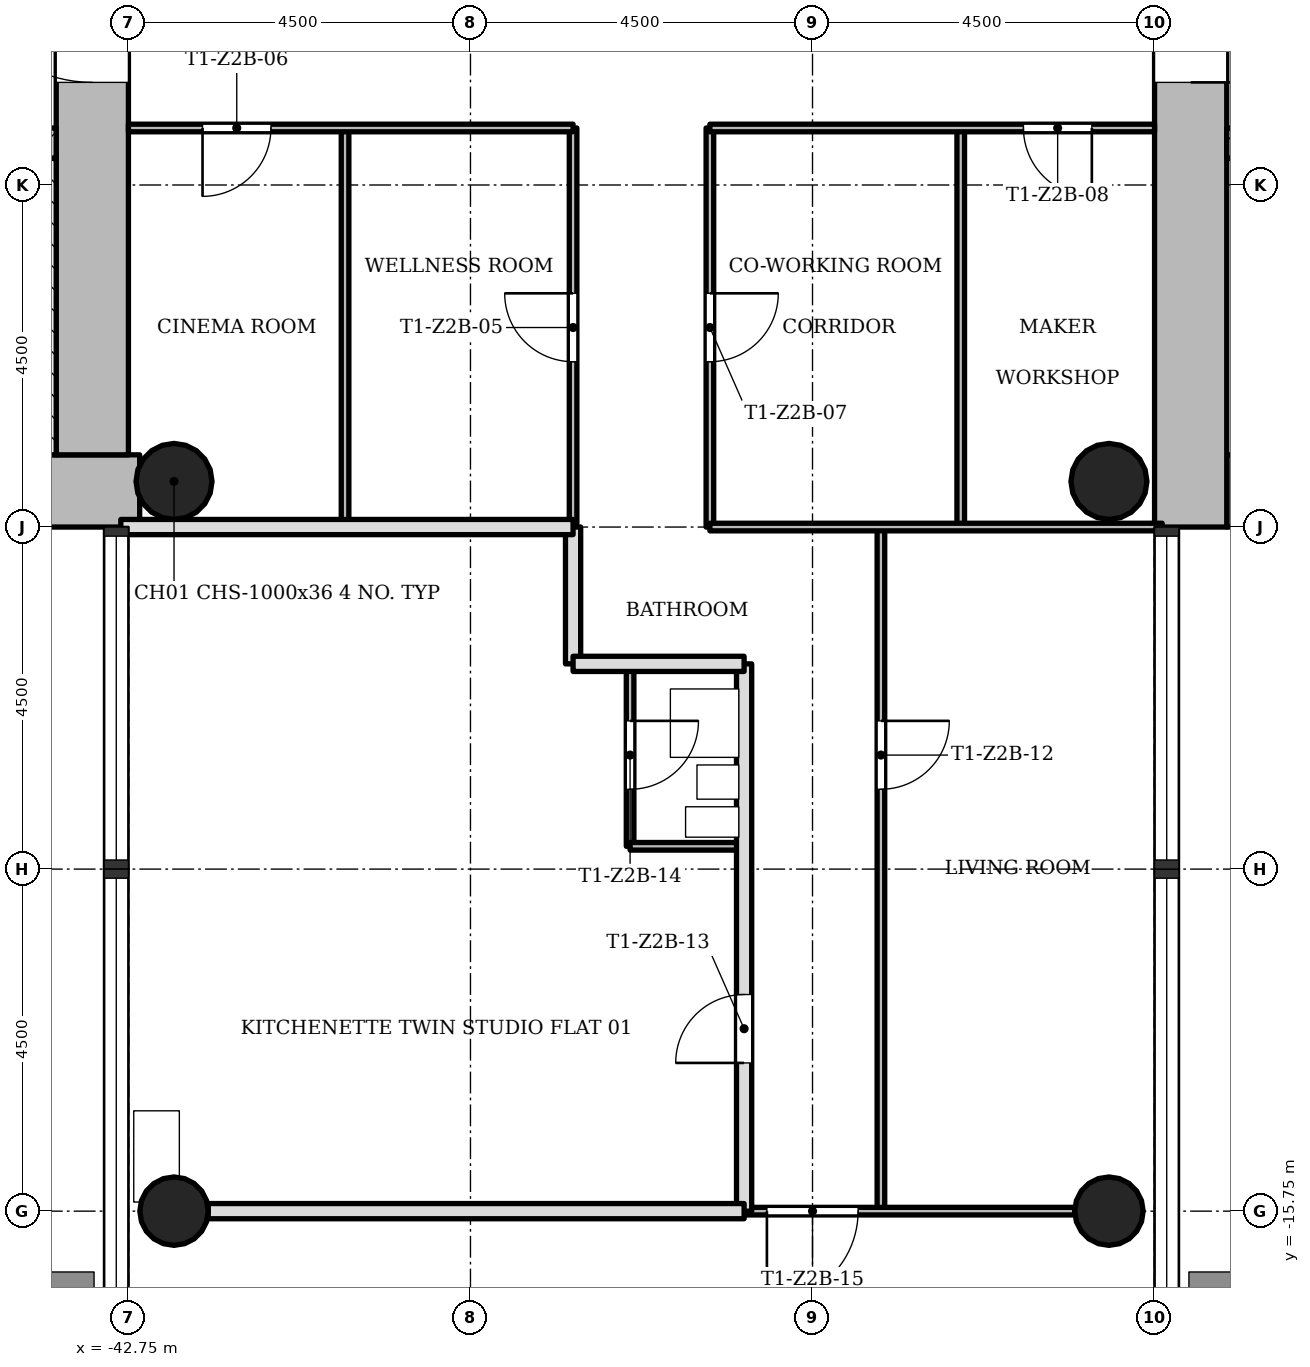
"""IFC4 building model, lengths in metres.
Left out: names, types, materials, properties, quantities, classifications, styles, units other than length and angle.
Written with IfcOpenShell. Run it as: python <this file> out.ifc"""

import sys

from ifc_helpers import new_model, si_unit, direction, frame, frame_2d, origin, origin_2d, place, context, subcontext, project, spatial, rectangle, hollow_circle, extrude, element, fill, save


model = new_model("IFC4")
c1 = context("Model", 3, precision=1e-05, world=origin(), true_north=direction((0.0, 1.0)))
c2 = subcontext(c1, "Body", "Model", "MODEL_VIEW")
j1 = project(units=[si_unit("LENGTHUNIT", "METRE"), si_unit("PLANEANGLEUNIT", "RADIAN")], contexts=[c1])
p1 = place(None, origin())
s1 = spatial("IfcSite", under=j1, at=p1, CompositionType="ELEMENT")
p2 = place(p1, origin())
s2 = spatial("IfcBuilding", under=s1, at=p2, CompositionType="ELEMENT")
p3 = place(p2, frame((0.0, 0.0, 80.0)))
s3 = spatial("IfcBuildingStorey", under=s2, at=p3, CompositionType="ELEMENT", Elevation=80.0)
p4 = place(p3, frame((-28.3, -6.275, 0.0), z_axis=(0.0, 0.0, 1.0), x_axis=(1.0, 0.0, 0.0)))
e1 = element("IfcWall", 1, at=p4, inside=s3, PredefinedType="SHEAR", context=c2, shape_type="SweptSolid", body=[
    extrude(rectangle(XDim=8.05, YDim=0.95, at=frame_2d((4.025, 0.0))), origin(), (0.0, 0.0, 1.0), 3.4),
])
p5 = place(p3, frame((-28.775, 5.8, 0.0), z_axis=(0.0, 0.0, 1.0), x_axis=(0.0, -1.0, 0.0)))
e2 = element("IfcWall", 2, at=p5, inside=s3, PredefinedType="SHEAR", context=c2, shape_type="SweptSolid", body=[
    extrude(rectangle(XDim=12.55, YDim=0.95, at=frame_2d((6.275, 0.0))), origin(), (0.0, 0.0, 1.0), 3.4),
])
p6 = place(p5, frame((4.9, 0.0, 0.0)))
e3 = element("IfcOpeningElement", 3, at=p6, cuts=e2, PredefinedType="OPENING", context=c2, shape_type="SweptSolid", body=[
    extrude(rectangle(XDim=1.8, YDim=2.1, at=frame_2d((0.9, 1.05))), frame((0.0, 0.485, 0.0), z_axis=(0.0, -1.0, 0.0), x_axis=(1.0, 0.0, 0.0)), (0.0, 0.0, 1.0), 0.97),
])
p7 = place(p3, frame((-28.3, -1.7, 0.0), z_axis=(0.0, 0.0, 1.0), x_axis=(1.0, 0.0, 0.0)))
e4 = element("IfcWall", 4, at=p7, inside=s3, PredefinedType="SHEAR", context=c2, shape_type="SweptSolid", body=[
    extrude(rectangle(XDim=7.1, YDim=0.4, at=frame_2d((3.55, 0.0))), origin(), (0.0, 0.0, 1.0), 3.4),
])
p8 = place(p7, frame((0.8, 0.0, 0.0)))
e5 = element("IfcOpeningElement", 5, at=p8, cuts=e4, PredefinedType="OPENING", context=c2, shape_type="SweptSolid", body=[
    extrude(rectangle(XDim=1.1, YDim=2.1, at=frame_2d((0.55, 1.05))), frame((0.0, 0.21, 0.0), z_axis=(0.0, -1.0, 0.0), x_axis=(1.0, 0.0, 0.0)), (0.0, 0.0, 1.0), 0.42),
])
p9 = place(p7, frame((3.0, 0.0, 0.0)))
e6 = element("IfcOpeningElement", 6, at=p9, cuts=e4, PredefinedType="OPENING", context=c2, shape_type="SweptSolid", body=[
    extrude(rectangle(XDim=1.1, YDim=2.1, at=frame_2d((0.55, 1.05))), frame((0.0, 0.21, 0.0), z_axis=(0.0, -1.0, 0.0), x_axis=(1.0, 0.0, 0.0)), (0.0, 0.0, 1.0), 0.42),
])
p10 = place(p7, frame((5.2, 0.0, 0.0)))
e7 = element("IfcOpeningElement", 7, at=p10, cuts=e4, PredefinedType="OPENING", context=c2, shape_type="SweptSolid", body=[
    extrude(rectangle(XDim=1.1, YDim=2.1, at=frame_2d((0.55, 1.05))), frame((0.0, 0.21, 0.0), z_axis=(0.0, -1.0, 0.0), x_axis=(1.0, 0.0, 0.0)), (0.0, 0.0, 1.0), 0.42),
])
p11 = place(p3, frame((-51.298, -6.275, 0.0), z_axis=(0.0, 0.0, 1.0), x_axis=(1.0, 0.0, 0.0)))
e8 = element("IfcWall", 8, at=p11, inside=s3, PredefinedType="SHEAR", context=c2, shape_type="SweptSolid", body=[
    extrude(rectangle(XDim=8.696, YDim=0.95, at=frame_2d((4.348, 0.0))), origin(), (0.0, 0.0, 1.0), 3.4),
])
p12 = place(p3, frame((-43.225, -5.8, 0.0), z_axis=(0.0, 0.0, 1.0), x_axis=(0.0, 1.0, 0.0)))
e9 = element("IfcWall", 9, at=p12, inside=s3, PredefinedType="SHEAR", context=c2, shape_type="SweptSolid", body=[
    extrude(rectangle(XDim=12.55, YDim=0.95, at=frame_2d((6.275, 0.0))), origin(), (0.0, 0.0, 1.0), 3.4),
])
p13 = place(p12, frame((4.9, 0.0, 0.0)))
e10 = element("IfcOpeningElement", 10, at=p13, cuts=e9, PredefinedType="OPENING", context=c2, shape_type="SweptSolid", body=[
    extrude(rectangle(XDim=1.8, YDim=2.1, at=frame_2d((0.9, 1.05))), frame((0.0, 0.485, 0.0), z_axis=(0.0, -1.0, 0.0), x_axis=(1.0, 0.0, 0.0)), (0.0, 0.0, 1.0), 0.97),
])
p14 = place(p3, frame((-50.8, -1.7, 0.0), z_axis=(0.0, 0.0, 1.0), x_axis=(1.0, 0.0, 0.0)))
e11 = element("IfcWall", 11, at=p14, inside=s3, PredefinedType="SHEAR", context=c2, shape_type="SweptSolid", body=[
    extrude(rectangle(XDim=7.1, YDim=0.4, at=frame_2d((3.55, 0.0))), origin(), (0.0, 0.0, 1.0), 3.4),
])
p15 = place(p14, frame((5.5, 0.0, 0.0)))
e12 = element("IfcOpeningElement", 12, at=p15, cuts=e11, PredefinedType="OPENING", context=c2, shape_type="SweptSolid", body=[
    extrude(rectangle(XDim=0.9, YDim=2.1, at=frame_2d((0.45, 1.05))), frame((0.0, 0.21, 0.0), z_axis=(0.0, -1.0, 0.0), x_axis=(1.0, 0.0, 0.0)), (0.0, 0.0, 1.0), 0.42),
])
for number, where, z_axis, x_axis in (
    (13, (-42.15, -15.75, 0.0), (0.0, 0.0, 1.0), (1.0, 0.0, 0.0)),
    (14, (-29.85, -15.75, 0.0), (0.0, 0.0, 1.0), (1.0, 0.0, 0.0)),
):
    element("IfcColumn", number, at=place(p3, frame(where, z_axis=z_axis, x_axis=x_axis)), inside=s3, PredefinedType="COLUMN", context=c2, shape_type="SweptSolid", body=[
        extrude(hollow_circle(Radius=0.45, WallThickness=0.032, at=origin_2d()), origin(), (0.0, 0.0, 1.0), 3.4),
    ])
for number, where, z_axis, x_axis in (
    (15, (-42.15, -6.15, 0.0), (0.0, 0.0, 1.0), (1.0, 0.0, 0.0)),
    (16, (-29.85, -6.15, 0.0), (0.0, 0.0, 1.0), (1.0, 0.0, 0.0)),
):
    element("IfcColumn", number, at=place(p3, frame(where, z_axis=z_axis, x_axis=x_axis)), inside=s3, PredefinedType="COLUMN", context=c2, shape_type="SweptSolid", body=[
        extrude(hollow_circle(Radius=0.5, WallThickness=0.036, at=origin_2d()), origin(), (0.0, 0.0, 1.0), 3.4),
    ])
p16 = place(p3, frame((-39.9, -6.75, 0.0), z_axis=(0.0, 0.0, 1.0), x_axis=(0.0, 1.0, 0.0)))
e17 = element("IfcWall", 17, at=p16, inside=s3, PredefinedType="PARTITIONING", context=c2, shape_type="SweptSolid", body=[
    extrude(rectangle(XDim=5.25, YDim=0.1, at=frame_2d((2.625, 0.0))), origin(), (0.0, 0.0, 1.0), 3.0),
])
p17 = place(p3, frame((-36.9, -6.75, 0.0), z_axis=(0.0, 0.0, 1.0), x_axis=(0.0, 1.0, 0.0)))
e18 = element("IfcWall", 18, at=p17, inside=s3, PredefinedType="PARTITIONING", context=c2, shape_type="SweptSolid", body=[
    extrude(rectangle(XDim=5.25, YDim=0.1, at=frame_2d((2.625, 0.0))), origin(), (0.0, 0.0, 1.0), 3.0),
])
p18 = place(p17, frame((2.175, 0.0, 0.0)))
e19 = element("IfcOpeningElement", 19, at=p18, cuts=e18, PredefinedType="OPENING", context=c2, shape_type="SweptSolid", body=[
    extrude(rectangle(XDim=0.9, YDim=2.1, at=frame_2d((0.45, 1.05))), frame((0.0, 0.06, 0.0), z_axis=(0.0, -1.0, 0.0), x_axis=(1.0, 0.0, 0.0)), (0.0, 0.0, 1.0), 0.12),
])
p19 = place(p3, frame((-36.9, -8.55, 0.0), z_axis=(0.0, 0.0, 1.0), x_axis=(0.0, 1.0, 0.0)))
e20 = element("IfcWall", 20, at=p19, inside=s3, PredefinedType="SOLIDWALL", context=c2, shape_type="SweptSolid", body=[
    extrude(rectangle(XDim=1.8, YDim=0.2, at=frame_2d((0.9, 0.0))), origin(), (0.0, 0.0, 1.0), 3.0),
])
p20 = place(p3, frame((-36.15, -10.95, 0.0), z_axis=(0.0, 0.0, 1.0), x_axis=(0.0, 1.0, 0.0)))
e21 = element("IfcWall", 21, at=p20, inside=s3, PredefinedType="PARTITIONING", context=c2, shape_type="SweptSolid", body=[
    extrude(rectangle(XDim=2.4, YDim=0.1, at=frame_2d((1.2, 0.0))), origin(), (0.0, 0.0, 1.0), 3.0),
])
p21 = place(p20, frame((0.75, 0.0, 0.0)))
e22 = element("IfcOpeningElement", 22, at=p21, cuts=e21, PredefinedType="OPENING", context=c2, shape_type="SweptSolid", body=[
    extrude(rectangle(XDim=0.9, YDim=2.1, at=frame_2d((0.45, 1.05))), frame((0.0, 0.06, 0.0), z_axis=(0.0, -1.0, 0.0), x_axis=(1.0, 0.0, 0.0)), (0.0, 0.0, 1.0), 0.12),
])
p22 = place(p3, frame((-35.1, -6.75, 0.0), z_axis=(0.0, 0.0, 1.0), x_axis=(0.0, 1.0, 0.0)))
e23 = element("IfcWall", 23, at=p22, inside=s3, PredefinedType="PARTITIONING", context=c2, shape_type="SweptSolid", body=[
    extrude(rectangle(XDim=5.25, YDim=0.1, at=frame_2d((2.625, 0.0))), origin(), (0.0, 0.0, 1.0), 3.0),
])
p23 = place(p22, frame((2.175, 0.0, 0.0)))
e24 = element("IfcOpeningElement", 24, at=p23, cuts=e23, PredefinedType="OPENING", context=c2, shape_type="SweptSolid", body=[
    extrude(rectangle(XDim=0.9, YDim=2.1, at=frame_2d((0.45, 1.05))), frame((0.0, 0.06, 0.0), z_axis=(0.0, -1.0, 0.0), x_axis=(1.0, 0.0, 0.0)), (0.0, 0.0, 1.0), 0.12),
])
p24 = place(p3, frame((-34.65, -15.75, 0.0), z_axis=(0.0, 0.0, 1.0), x_axis=(0.0, 1.0, 0.0)))
e25 = element("IfcWall", 25, at=p24, inside=s3, PredefinedType="SOLIDWALL", context=c2, shape_type="SweptSolid", body=[
    extrude(rectangle(XDim=7.2, YDim=0.2, at=frame_2d((3.6, 0.0))), origin(), (0.0, 0.0, 1.0), 3.0),
])
p25 = place(p24, frame((1.95, 0.0, 0.0)))
e26 = element("IfcOpeningElement", 26, at=p25, cuts=e25, PredefinedType="OPENING", context=c2, shape_type="SweptSolid", body=[
    extrude(rectangle(XDim=0.9, YDim=2.1, at=frame_2d((0.45, 1.05))), frame((0.0, 0.11, 0.0), z_axis=(0.0, -1.0, 0.0), x_axis=(1.0, 0.0, 0.0)), (0.0, 0.0, 1.0), 0.22),
])
p26 = place(p3, frame((-32.85, -15.75, 0.0), z_axis=(0.0, 0.0, 1.0), x_axis=(0.0, 1.0, 0.0)))
e27 = element("IfcWall", 27, at=p26, inside=s3, PredefinedType="PARTITIONING", context=c2, shape_type="SweptSolid", body=[
    extrude(rectangle(XDim=9.0, YDim=0.1, at=frame_2d((4.5, 0.0))), origin(), (0.0, 0.0, 1.0), 3.0),
])
p27 = place(p26, frame((5.55, 0.0, 0.0)))
e28 = element("IfcOpeningElement", 28, at=p27, cuts=e27, PredefinedType="OPENING", context=c2, shape_type="SweptSolid", body=[
    extrude(rectangle(XDim=0.9, YDim=2.1, at=frame_2d((0.45, 1.05))), frame((0.0, 0.06, 0.0), z_axis=(0.0, -1.0, 0.0), x_axis=(1.0, 0.0, 0.0)), (0.0, 0.0, 1.0), 0.12),
])
p28 = place(p3, frame((-31.8, -6.75, 0.0), z_axis=(0.0, 0.0, 1.0), x_axis=(0.0, 1.0, 0.0)))
e29 = element("IfcWall", 29, at=p28, inside=s3, PredefinedType="PARTITIONING", context=c2, shape_type="SweptSolid", body=[
    extrude(rectangle(XDim=5.25, YDim=0.1, at=frame_2d((2.625, 0.0))), origin(), (0.0, 0.0, 1.0), 3.0),
])
p29 = place(p3, frame((-34.65, -15.75, 0.0), z_axis=(0.0, 0.0, 1.0), x_axis=(1.0, 0.0, 0.0)))
e30 = element("IfcWall", 30, at=p29, inside=s3, PredefinedType="PARTITIONING", context=c2, shape_type="SweptSolid", body=[
    extrude(rectangle(XDim=4.35, YDim=0.1, at=frame_2d((2.175, 0.0))), origin(), (0.0, 0.0, 1.0), 3.0),
])
p30 = place(p29, frame((0.3, 0.0, 0.0)))
e31 = element("IfcOpeningElement", 31, at=p30, cuts=e30, PredefinedType="OPENING", context=c2, shape_type="SweptSolid", body=[
    extrude(rectangle(XDim=1.2, YDim=2.1, at=frame_2d((0.6, 1.05))), frame((0.0, 0.06, 0.0), z_axis=(0.0, -1.0, 0.0), x_axis=(1.0, 0.0, 0.0)), (0.0, 0.0, 1.0), 0.12),
])
p31 = place(p3, frame((-41.7, -15.75, 0.0), z_axis=(0.0, 0.0, 1.0), x_axis=(1.0, 0.0, 0.0)))
e32 = element("IfcWall", 32, at=p31, inside=s3, PredefinedType="SOLIDWALL", context=c2, shape_type="SweptSolid", body=[
    extrude(rectangle(XDim=7.05, YDim=0.2, at=frame_2d((3.525, 0.0))), origin(), (0.0, 0.0, 1.0), 3.0),
])
p32 = place(p3, frame((-36.15, -10.95, 0.0), z_axis=(0.0, 0.0, 1.0), x_axis=(1.0, 0.0, 0.0)))
e33 = element("IfcWall", 33, at=p32, inside=s3, PredefinedType="PARTITIONING", context=c2, shape_type="SweptSolid", body=[
    extrude(rectangle(XDim=1.5, YDim=0.1, at=frame_2d((0.75, 0.0))), origin(), (0.0, 0.0, 1.0), 3.0),
])
p33 = place(p3, frame((-36.9, -8.55, 0.0), z_axis=(0.0, 0.0, 1.0), x_axis=(1.0, 0.0, 0.0)))
e34 = element("IfcWall", 34, at=p33, inside=s3, PredefinedType="SOLIDWALL", context=c2, shape_type="SweptSolid", body=[
    extrude(rectangle(XDim=2.25, YDim=0.2, at=frame_2d((1.125, 0.0))), origin(), (0.0, 0.0, 1.0), 3.0),
])
p34 = place(p3, frame((-35.1, -6.75, 0.0), z_axis=(0.0, 0.0, 1.0), x_axis=(1.0, 0.0, 0.0)))
e35 = element("IfcWall", 35, at=p34, inside=s3, PredefinedType="PARTITIONING", context=c2, shape_type="SweptSolid", body=[
    extrude(rectangle(XDim=5.95, YDim=0.1, at=frame_2d((2.975, 0.0))), origin(), (0.0, 0.0, 1.0), 3.0),
])
p35 = place(p3, frame((-42.85, -6.75, 0.0), z_axis=(0.0, 0.0, 1.0), x_axis=(1.0, 0.0, 0.0)))
e36 = element("IfcWall", 36, at=p35, inside=s3, PredefinedType="SOLIDWALL", context=c2, shape_type="SweptSolid", body=[
    extrude(rectangle(XDim=5.95, YDim=0.2, at=frame_2d((2.975, 0.0))), origin(), (0.0, 0.0, 1.0), 3.0),
])
p36 = place(p3, frame((-42.75, -1.5, 0.0), z_axis=(0.0, 0.0, 1.0), x_axis=(1.0, 0.0, 0.0)))
e37 = element("IfcWall", 37, at=p36, inside=s3, PredefinedType="PARTITIONING", context=c2, shape_type="SweptSolid", body=[
    extrude(rectangle(XDim=5.85, YDim=0.1, at=frame_2d((2.925, 0.0))), origin(), (0.0, 0.0, 1.0), 3.0),
])
p37 = place(p36, frame((0.975, 0.0, 0.0)))
e38 = element("IfcOpeningElement", 38, at=p37, cuts=e37, PredefinedType="OPENING", context=c2, shape_type="SweptSolid", body=[
    extrude(rectangle(XDim=0.9, YDim=2.1, at=frame_2d((0.45, 1.05))), frame((0.0, 0.06, 0.0), z_axis=(0.0, -1.0, 0.0), x_axis=(1.0, 0.0, 0.0)), (0.0, 0.0, 1.0), 0.12),
])
p38 = place(p3, frame((-35.1, -1.5, 0.0), z_axis=(0.0, 0.0, 1.0), x_axis=(1.0, 0.0, 0.0)))
e39 = element("IfcWall", 39, at=p38, inside=s3, PredefinedType="PARTITIONING", context=c2, shape_type="SweptSolid", body=[
    extrude(rectangle(XDim=5.85, YDim=0.1, at=frame_2d((2.925, 0.0))), origin(), (0.0, 0.0, 1.0), 3.0),
])
p39 = place(p38, frame((4.125, 0.0, 0.0)))
e40 = element("IfcOpeningElement", 40, at=p39, cuts=e39, PredefinedType="OPENING", context=c2, shape_type="SweptSolid", body=[
    extrude(rectangle(XDim=0.9, YDim=2.1, at=frame_2d((0.45, 1.05))), frame((0.0, 0.06, 0.0), z_axis=(0.0, -1.0, 0.0), x_axis=(1.0, 0.0, 0.0)), (0.0, 0.0, 1.0), 0.12),
])
p40 = place(p3, frame((-43.825, -1.9, 0.0), z_axis=(0.0, 0.0, 1.0), x_axis=(0.0, -1.0, 0.0)))
e41 = element("IfcWall", 41, at=p40, inside=s3, PredefinedType="SHEAR", context=c2, shape_type="SweptSolid", body=[
    extrude(rectangle(XDim=3.9, YDim=0.25, at=frame_2d((1.95, 0.0))), origin(), (0.0, 0.0, 1.0), 3.4),
])
p41 = place(p18, origin())
e42 = element("IfcDoor", 42, at=p41, inside=s3, OperationType="SINGLE_SWING_LEFT", PredefinedType="DOOR", context=c2, shape_type="SweptSolid", body=[
    extrude(rectangle(XDim=0.9, YDim=2.1, at=frame_2d((0.45, 1.05))), frame((0.0, 0.025, 0.0), z_axis=(0.0, -1.0, 0.0), x_axis=(1.0, 0.0, 0.0)), (0.0, 0.0, 1.0), 0.05),
])
fill(e19, e42)
p42 = place(p37, origin())
e43 = element("IfcDoor", 43, at=p42, inside=s3, OperationType="SINGLE_SWING_LEFT", PredefinedType="DOOR", context=c2, shape_type="SweptSolid", body=[
    extrude(rectangle(XDim=0.9, YDim=2.1, at=frame_2d((0.45, 1.05))), frame((0.0, 0.025, 0.0), z_axis=(0.0, -1.0, 0.0), x_axis=(1.0, 0.0, 0.0)), (0.0, 0.0, 1.0), 0.05),
])
fill(e38, e43)
p43 = place(p23, origin())
e44 = element("IfcDoor", 44, at=p43, inside=s3, OperationType="SINGLE_SWING_RIGHT", PredefinedType="DOOR", context=c2, shape_type="SweptSolid", body=[
    extrude(rectangle(XDim=0.9, YDim=2.1, at=frame_2d((0.45, 1.05))), frame((0.0, 0.025, 0.0), z_axis=(0.0, -1.0, 0.0), x_axis=(1.0, 0.0, 0.0)), (0.0, 0.0, 1.0), 0.05),
])
fill(e24, e44)
p44 = place(p39, origin())
e45 = element("IfcDoor", 45, at=p44, inside=s3, OperationType="SINGLE_SWING_RIGHT", PredefinedType="DOOR", context=c2, shape_type="SweptSolid", body=[
    extrude(rectangle(XDim=0.9, YDim=2.1, at=frame_2d((0.45, 1.05))), frame((0.0, 0.025, 0.0), z_axis=(0.0, -1.0, 0.0), x_axis=(1.0, 0.0, 0.0)), (0.0, 0.0, 1.0), 0.05),
])
fill(e40, e45)
p45 = place(p27, origin())
e46 = element("IfcDoor", 46, at=p45, inside=s3, OperationType="SINGLE_SWING_RIGHT", PredefinedType="DOOR", context=c2, shape_type="SweptSolid", body=[
    extrude(rectangle(XDim=0.9, YDim=2.1, at=frame_2d((0.45, 1.05))), frame((0.0, 0.025, 0.0), z_axis=(0.0, -1.0, 0.0), x_axis=(1.0, 0.0, 0.0)), (0.0, 0.0, 1.0), 0.05),
])
fill(e28, e46)
p46 = place(p25, origin())
e47 = element("IfcDoor", 47, at=p46, inside=s3, OperationType="SINGLE_SWING_RIGHT", PredefinedType="DOOR", context=c2, shape_type="SweptSolid", body=[
    extrude(rectangle(XDim=0.9, YDim=2.1, at=frame_2d((0.45, 1.05))), frame((0.0, 0.025, 0.0), z_axis=(0.0, -1.0, 0.0), x_axis=(1.0, 0.0, 0.0)), (0.0, 0.0, 1.0), 0.05),
])
fill(e26, e47)
p47 = place(p21, origin())
e48 = element("IfcDoor", 48, at=p47, inside=s3, OperationType="SINGLE_SWING_RIGHT", PredefinedType="DOOR", context=c2, shape_type="SweptSolid", body=[
    extrude(rectangle(XDim=0.9, YDim=2.1, at=frame_2d((0.45, 1.05))), frame((0.0, 0.025, 0.0), z_axis=(0.0, -1.0, 0.0), x_axis=(1.0, 0.0, 0.0)), (0.0, 0.0, 1.0), 0.05),
])
fill(e22, e48)
p48 = place(p30, origin())
e49 = element("IfcDoor", 49, at=p48, inside=s3, OperationType="SINGLE_SWING_LEFT", PredefinedType="DOOR", context=c2, shape_type="SweptSolid", body=[
    extrude(rectangle(XDim=1.2, YDim=2.1, at=frame_2d((0.6, 1.05))), frame((0.0, 0.025, 0.0), z_axis=(0.0, -1.0, 0.0), x_axis=(1.0, 0.0, 0.0)), (0.0, 0.0, 1.0), 0.05),
])
fill(e31, e49)
p49 = place(p6, origin())
e50 = element("IfcDoor", 50, at=p49, inside=s3, OperationType="SINGLE_SWING_LEFT", PredefinedType="DOOR", context=c2, shape_type="SweptSolid", body=[
    extrude(rectangle(XDim=1.8, YDim=2.1, at=frame_2d((0.9, 1.05))), frame((0.0, 0.025, 0.0), z_axis=(0.0, -1.0, 0.0), x_axis=(1.0, 0.0, 0.0)), (0.0, 0.0, 1.0), 0.05),
])
fill(e3, e50)
p50 = place(p13, origin())
e51 = element("IfcDoor", 51, at=p50, inside=s3, OperationType="SINGLE_SWING_LEFT", PredefinedType="DOOR", context=c2, shape_type="SweptSolid", body=[
    extrude(rectangle(XDim=1.8, YDim=2.1, at=frame_2d((0.9, 1.05))), frame((0.0, 0.025, 0.0), z_axis=(0.0, -1.0, 0.0), x_axis=(1.0, 0.0, 0.0)), (0.0, 0.0, 1.0), 0.05),
])
fill(e10, e51)
save(model, sys.argv[1])
